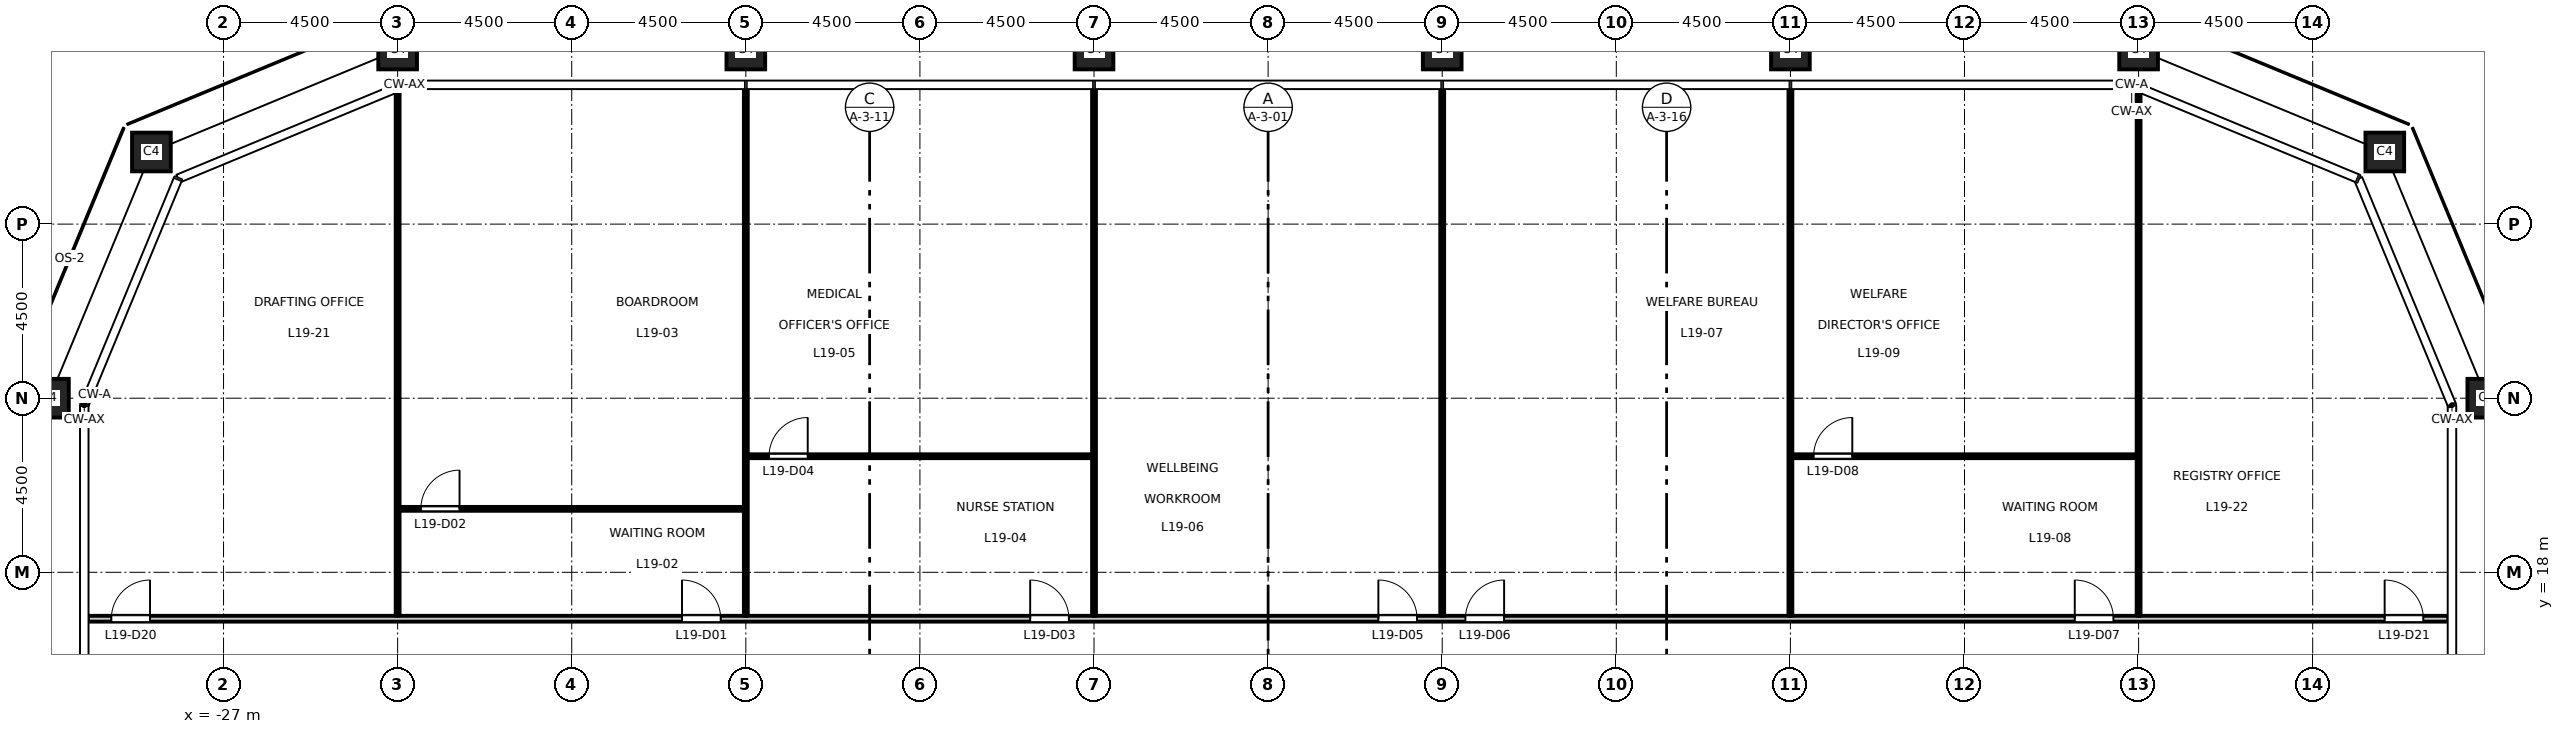
"""IFC4 building model, lengths in metres.
Left out: names, types, materials, properties, quantities, classifications, styles, units other than length and angle.
Written with IfcOpenShell. Run it as: python <this file> out.ifc"""

import sys

from ifc_helpers import new_model, si_unit, direction, frame, frame_2d, origin, origin_2d, place, context, subcontext, project, spatial, rectangle, hollow_rectangle, extrude, element, fill, save


model = new_model("IFC4")
c1 = context("Model", 3, precision=1e-05, world=origin(), true_north=direction((0.0, 1.0)))
c2 = subcontext(c1, "Body", "Model", "MODEL_VIEW")
j1 = project(units=[si_unit("LENGTHUNIT", "METRE"), si_unit("PLANEANGLEUNIT", "RADIAN")], contexts=[c1])
p1 = place(None, origin())
s1 = spatial("IfcSite", under=j1, at=p1, CompositionType="ELEMENT")
p2 = place(p1, origin())
s2 = spatial("IfcBuilding", under=s1, at=p2, CompositionType="ELEMENT")
p3 = place(p2, frame((0.0, 0.0, 89.7)))
s3 = spatial("IfcBuildingStorey", under=s2, at=p3, CompositionType="ELEMENT", Elevation=89.7)
for number, where, z_axis, x_axis in (
    (1, (31.5, 22.5, 0.0), (0.0, 0.0, 1.0), (1.0, 0.0, 0.0)),
    (2, (28.864, 28.864, 0.0), (0.0, 0.0, 1.0), (1.0, 0.0, 0.0)),
    (3, (22.5, 31.5, 0.0), (0.0, 0.0, 1.0), (1.0, 0.0, 0.0)),
    (4, (13.5, 31.5, 0.0), (0.0, 0.0, 1.0), (1.0, 0.0, 0.0)),
    (5, (4.5, 31.5, 0.0), (0.0, 0.0, 1.0), (1.0, 0.0, 0.0)),
    (6, (-4.5, 31.5, 0.0), (0.0, 0.0, 1.0), (1.0, 0.0, 0.0)),
    (7, (-13.5, 31.5, 0.0), (0.0, 0.0, 1.0), (1.0, 0.0, 0.0)),
    (8, (-22.5, 31.5, 0.0), (0.0, 0.0, 1.0), (1.0, 0.0, 0.0)),
    (9, (-28.864, 28.864, 0.0), (0.0, 0.0, 1.0), (1.0, 0.0, 0.0)),
    (10, (-31.5, 22.5, 0.0), (0.0, 0.0, 1.0), (1.0, 0.0, 0.0)),
):
    element("IfcColumn", number, at=place(p3, frame(where, z_axis=z_axis, x_axis=x_axis)), inside=s3, PredefinedType="COLUMN", context=c2, shape_type="SweptSolid", body=[
        extrude(hollow_rectangle(XDim=1.0, YDim=1.0, WallThickness=0.06, at=origin_2d()), origin(), (0.0, 0.0, 1.0), 4.5),
    ])
p4 = place(p3, frame((-30.51, 16.8, 0.0), z_axis=(0.0, 0.0, 1.0), x_axis=(1.0, 0.0, 0.0)))
e11 = element("IfcWall", 11, at=p4, inside=s3, PredefinedType="PARTITIONING", context=c2, shape_type="SweptSolid", body=[
    extrude(rectangle(XDim=61.02, YDim=0.15, at=frame_2d((30.51, 0.0))), origin(), (0.0, 0.0, 1.0), 4.3),
])
p5 = place(p4, frame((15.36, 0.0, 0.0)))
e12 = element("IfcOpeningElement", 12, at=p5, cuts=e11, PredefinedType="OPENING", context=c2, shape_type="SweptSolid", body=[
    extrude(rectangle(XDim=1.0, YDim=2.1, at=frame_2d((0.5, 1.05))), frame((0.0, 0.085, 0.0), z_axis=(0.0, -1.0, 0.0), x_axis=(1.0, 0.0, 0.0)), (0.0, 0.0, 1.0), 0.17),
])
p6 = place(p4, frame((24.36, 0.0, 0.0)))
e13 = element("IfcOpeningElement", 13, at=p6, cuts=e11, PredefinedType="OPENING", context=c2, shape_type="SweptSolid", body=[
    extrude(rectangle(XDim=1.0, YDim=2.1, at=frame_2d((0.5, 1.05))), frame((0.0, 0.085, 0.0), z_axis=(0.0, -1.0, 0.0), x_axis=(1.0, 0.0, 0.0)), (0.0, 0.0, 1.0), 0.17),
])
p7 = place(p4, frame((33.36, 0.0, 0.0)))
e14 = element("IfcOpeningElement", 14, at=p7, cuts=e11, PredefinedType="OPENING", context=c2, shape_type="SweptSolid", body=[
    extrude(rectangle(XDim=1.0, YDim=2.1, at=frame_2d((0.5, 1.05))), frame((0.0, 0.085, 0.0), z_axis=(0.0, -1.0, 0.0), x_axis=(1.0, 0.0, 0.0)), (0.0, 0.0, 1.0), 0.17),
])
p8 = place(p4, frame((35.61, 0.0, 0.0)))
e15 = element("IfcOpeningElement", 15, at=p8, cuts=e11, PredefinedType="OPENING", context=c2, shape_type="SweptSolid", body=[
    extrude(rectangle(XDim=1.0, YDim=2.1, at=frame_2d((0.5, 1.05))), frame((0.0, 0.085, 0.0), z_axis=(0.0, -1.0, 0.0), x_axis=(1.0, 0.0, 0.0)), (0.0, 0.0, 1.0), 0.17),
])
p9 = place(p4, frame((51.36, 0.0, 0.0)))
e16 = element("IfcOpeningElement", 16, at=p9, cuts=e11, PredefinedType="OPENING", context=c2, shape_type="SweptSolid", body=[
    extrude(rectangle(XDim=1.0, YDim=2.1, at=frame_2d((0.5, 1.05))), frame((0.0, 0.085, 0.0), z_axis=(0.0, -1.0, 0.0), x_axis=(1.0, 0.0, 0.0)), (0.0, 0.0, 1.0), 0.17),
])
p10 = place(p4, frame((0.61, 0.0, 0.0)))
e17 = element("IfcOpeningElement", 17, at=p10, cuts=e11, PredefinedType="OPENING", context=c2, shape_type="SweptSolid", body=[
    extrude(rectangle(XDim=1.0, YDim=2.1, at=frame_2d((0.5, 1.05))), frame((0.0, 0.085, 0.0), z_axis=(0.0, -1.0, 0.0), x_axis=(1.0, 0.0, 0.0)), (0.0, 0.0, 1.0), 0.17),
])
p11 = place(p4, frame((59.37, 0.0, 0.0)))
e18 = element("IfcOpeningElement", 18, at=p11, cuts=e11, PredefinedType="OPENING", context=c2, shape_type="SweptSolid", body=[
    extrude(rectangle(XDim=1.0, YDim=2.1, at=frame_2d((0.5, 1.05))), frame((0.0, 0.085, 0.0), z_axis=(0.0, -1.0, 0.0), x_axis=(1.0, 0.0, 0.0)), (0.0, 0.0, 1.0), 0.17),
])
p12 = place(p3, frame((-22.45, 19.64, 0.0), z_axis=(0.0, 0.0, 1.0), x_axis=(1.0, 0.0, 0.0)))
e19 = element("IfcWall", 19, at=p12, inside=s3, PredefinedType="PARTITIONING", context=c2, shape_type="SweptSolid", body=[
    extrude(rectangle(XDim=8.9, YDim=0.1, at=frame_2d((4.45, 0.0))), origin(), (0.0, 0.0, 1.0), 4.3),
])
p13 = place(p12, frame((0.55, 0.0, 0.0)))
e20 = element("IfcOpeningElement", 20, at=p13, cuts=e19, PredefinedType="OPENING", context=c2, shape_type="SweptSolid", body=[
    extrude(rectangle(XDim=1.0, YDim=2.1, at=frame_2d((0.5, 1.05))), frame((0.0, 0.06, 0.0), z_axis=(0.0, -1.0, 0.0), x_axis=(1.0, 0.0, 0.0)), (0.0, 0.0, 1.0), 0.12),
])
p14 = place(p3, frame((-13.45, 21.0, 0.0), z_axis=(0.0, 0.0, 1.0), x_axis=(1.0, 0.0, 0.0)))
e21 = element("IfcWall", 21, at=p14, inside=s3, PredefinedType="PARTITIONING", context=c2, shape_type="SweptSolid", body=[
    extrude(rectangle(XDim=8.9, YDim=0.1, at=frame_2d((4.45, 0.0))), origin(), (0.0, 0.0, 1.0), 4.3),
])
p15 = place(p14, frame((0.55, 0.0, 0.0)))
e22 = element("IfcOpeningElement", 22, at=p15, cuts=e21, PredefinedType="OPENING", context=c2, shape_type="SweptSolid", body=[
    extrude(rectangle(XDim=1.0, YDim=2.1, at=frame_2d((0.5, 1.05))), frame((0.0, 0.06, 0.0), z_axis=(0.0, -1.0, 0.0), x_axis=(1.0, 0.0, 0.0)), (0.0, 0.0, 1.0), 0.12),
])
p16 = place(p3, frame((13.55, 21.0, 0.0), z_axis=(0.0, 0.0, 1.0), x_axis=(1.0, 0.0, 0.0)))
e23 = element("IfcWall", 23, at=p16, inside=s3, PredefinedType="PARTITIONING", context=c2, shape_type="SweptSolid", body=[
    extrude(rectangle(XDim=8.9, YDim=0.1, at=frame_2d((4.45, 0.0))), origin(), (0.0, 0.0, 1.0), 4.3),
])
p17 = place(p16, frame((0.55, 0.0, 0.0)))
e24 = element("IfcOpeningElement", 24, at=p17, cuts=e23, PredefinedType="OPENING", context=c2, shape_type="SweptSolid", body=[
    extrude(rectangle(XDim=1.0, YDim=2.1, at=frame_2d((0.5, 1.05))), frame((0.0, 0.06, 0.0), z_axis=(0.0, -1.0, 0.0), x_axis=(1.0, 0.0, 0.0)), (0.0, 0.0, 1.0), 0.12),
])
p18 = place(p3, frame((-22.5, 16.875, 0.0), z_axis=(0.0, 0.0, 1.0), x_axis=(0.0, 1.0, 0.0)))
e25 = element("IfcWall", 25, at=p18, inside=s3, PredefinedType="PARTITIONING", context=c2, shape_type="SweptSolid", body=[
    extrude(rectangle(XDim=13.553, YDim=0.1, at=frame_2d((6.776, 0.0))), origin(), (0.0, 0.0, 1.0), 3.3),
])
for number, where, z_axis, x_axis in (
    (26, (-13.5, 16.875, 0.0), (0.0, 0.0, 1.0), (0.0, 1.0, 0.0)),
    (27, (-4.5, 16.875, 0.0), (0.0, 0.0, 1.0), (0.0, 1.0, 0.0)),
    (28, (4.5, 16.875, 0.0), (0.0, 0.0, 1.0), (0.0, 1.0, 0.0)),
    (29, (13.5, 16.875, 0.0), (0.0, 0.0, 1.0), (0.0, 1.0, 0.0)),
):
    element("IfcWall", number, at=place(p3, frame(where, z_axis=z_axis, x_axis=x_axis)), inside=s3, PredefinedType="PARTITIONING", context=c2, shape_type="SweptSolid", body=[
        extrude(rectangle(XDim=13.635, YDim=0.1, at=frame_2d((6.817, 0.0))), origin(), (0.0, 0.0, 1.0), 3.3),
    ])
p19 = place(p3, frame((22.5, 16.875, 0.0), z_axis=(0.0, 0.0, 1.0), x_axis=(0.0, 1.0, 0.0)))
e30 = element("IfcWall", 30, at=p19, inside=s3, PredefinedType="PARTITIONING", context=c2, shape_type="SweptSolid", body=[
    extrude(rectangle(XDim=13.553, YDim=0.1, at=frame_2d((6.776, 0.0))), origin(), (0.0, 0.0, 1.0), 3.3),
])
p20 = place(p5, origin())
e31 = element("IfcDoor", 31, at=p20, inside=s3, OperationType="SINGLE_SWING_LEFT", PredefinedType="DOOR", context=c2, shape_type="SweptSolid", body=[
    extrude(rectangle(XDim=1.0, YDim=2.1, at=frame_2d((0.5, 1.05))), frame((0.0, 0.025, 0.0), z_axis=(0.0, -1.0, 0.0), x_axis=(1.0, 0.0, 0.0)), (0.0, 0.0, 1.0), 0.05),
])
fill(e12, e31)
p21 = place(p13, origin())
e32 = element("IfcDoor", 32, at=p21, inside=s3, OperationType="SINGLE_SWING_RIGHT", PredefinedType="DOOR", context=c2, shape_type="SweptSolid", body=[
    extrude(rectangle(XDim=1.0, YDim=2.1, at=frame_2d((0.5, 1.05))), frame((0.0, 0.025, 0.0), z_axis=(0.0, -1.0, 0.0), x_axis=(1.0, 0.0, 0.0)), (0.0, 0.0, 1.0), 0.05),
])
fill(e20, e32)
p22 = place(p6, origin())
e33 = element("IfcDoor", 33, at=p22, inside=s3, OperationType="SINGLE_SWING_LEFT", PredefinedType="DOOR", context=c2, shape_type="SweptSolid", body=[
    extrude(rectangle(XDim=1.0, YDim=2.1, at=frame_2d((0.5, 1.05))), frame((0.0, 0.025, 0.0), z_axis=(0.0, -1.0, 0.0), x_axis=(1.0, 0.0, 0.0)), (0.0, 0.0, 1.0), 0.05),
])
fill(e13, e33)
p23 = place(p15, origin())
e34 = element("IfcDoor", 34, at=p23, inside=s3, OperationType="SINGLE_SWING_RIGHT", PredefinedType="DOOR", context=c2, shape_type="SweptSolid", body=[
    extrude(rectangle(XDim=1.0, YDim=2.1, at=frame_2d((0.5, 1.05))), frame((0.0, 0.025, 0.0), z_axis=(0.0, -1.0, 0.0), x_axis=(1.0, 0.0, 0.0)), (0.0, 0.0, 1.0), 0.05),
])
fill(e22, e34)
p24 = place(p7, origin())
e35 = element("IfcDoor", 35, at=p24, inside=s3, OperationType="SINGLE_SWING_LEFT", PredefinedType="DOOR", context=c2, shape_type="SweptSolid", body=[
    extrude(rectangle(XDim=1.0, YDim=2.1, at=frame_2d((0.5, 1.05))), frame((0.0, 0.025, 0.0), z_axis=(0.0, -1.0, 0.0), x_axis=(1.0, 0.0, 0.0)), (0.0, 0.0, 1.0), 0.05),
])
fill(e14, e35)
p25 = place(p8, origin())
e36 = element("IfcDoor", 36, at=p25, inside=s3, OperationType="SINGLE_SWING_RIGHT", PredefinedType="DOOR", context=c2, shape_type="SweptSolid", body=[
    extrude(rectangle(XDim=1.0, YDim=2.1, at=frame_2d((0.5, 1.05))), frame((0.0, 0.025, 0.0), z_axis=(0.0, -1.0, 0.0), x_axis=(1.0, 0.0, 0.0)), (0.0, 0.0, 1.0), 0.05),
])
fill(e15, e36)
p26 = place(p9, origin())
e37 = element("IfcDoor", 37, at=p26, inside=s3, OperationType="SINGLE_SWING_LEFT", PredefinedType="DOOR", context=c2, shape_type="SweptSolid", body=[
    extrude(rectangle(XDim=1.0, YDim=2.1, at=frame_2d((0.5, 1.05))), frame((0.0, 0.025, 0.0), z_axis=(0.0, -1.0, 0.0), x_axis=(1.0, 0.0, 0.0)), (0.0, 0.0, 1.0), 0.05),
])
fill(e16, e37)
p27 = place(p17, origin())
e38 = element("IfcDoor", 38, at=p27, inside=s3, OperationType="SINGLE_SWING_RIGHT", PredefinedType="DOOR", context=c2, shape_type="SweptSolid", body=[
    extrude(rectangle(XDim=1.0, YDim=2.1, at=frame_2d((0.5, 1.05))), frame((0.0, 0.025, 0.0), z_axis=(0.0, -1.0, 0.0), x_axis=(1.0, 0.0, 0.0)), (0.0, 0.0, 1.0), 0.05),
])
fill(e24, e38)
p28 = place(p10, origin())
e39 = element("IfcDoor", 39, at=p28, inside=s3, OperationType="SINGLE_SWING_RIGHT", PredefinedType="DOOR", context=c2, shape_type="SweptSolid", body=[
    extrude(rectangle(XDim=1.0, YDim=2.1, at=frame_2d((0.5, 1.05))), frame((0.0, 0.025, 0.0), z_axis=(0.0, -1.0, 0.0), x_axis=(1.0, 0.0, 0.0)), (0.0, 0.0, 1.0), 0.05),
])
fill(e17, e39)
p29 = place(p11, origin())
e40 = element("IfcDoor", 40, at=p29, inside=s3, OperationType="SINGLE_SWING_LEFT", PredefinedType="DOOR", context=c2, shape_type="SweptSolid", body=[
    extrude(rectangle(XDim=1.0, YDim=2.1, at=frame_2d((0.5, 1.05))), frame((0.0, 0.025, 0.0), z_axis=(0.0, -1.0, 0.0), x_axis=(1.0, 0.0, 0.0)), (0.0, 0.0, 1.0), 0.05),
])
fill(e18, e40)
save(model, sys.argv[1])
